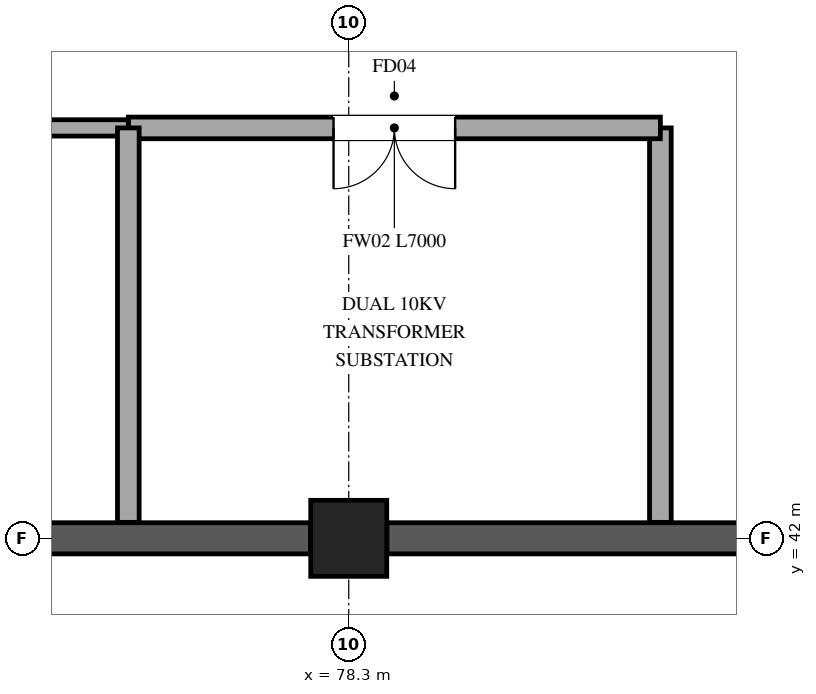
"""IFC4 building model, lengths in metres.
Left out: names, types, materials, properties, quantities, classifications, styles, units other than length and angle.
Written with IfcOpenShell. Run it as: python <this file> out.ifc"""

import sys

from ifc_helpers import new_model, si_unit, direction, frame, frame_2d, origin, origin_2d, place, context, subcontext, project, spatial, rectangle, extrude, element, fill, save


model = new_model("IFC4")
c1 = context("Model", 3, precision=1e-05, world=origin(), true_north=direction((0.0, 1.0)))
c2 = subcontext(c1, "Body", "Model", "MODEL_VIEW")
j1 = project(units=[si_unit("LENGTHUNIT", "METRE"), si_unit("PLANEANGLEUNIT", "RADIAN")], contexts=[c1])
p1 = place(None, origin())
s1 = spatial("IfcSite", under=j1, at=p1, CompositionType="ELEMENT")
p2 = place(p1, origin())
s2 = spatial("IfcBuilding", under=s1, at=p2, CompositionType="ELEMENT")
p3 = place(p2, frame((0.0, 0.0, -4.8)))
s3 = spatial("IfcBuildingStorey", under=s2, at=p3, CompositionType="ELEMENT", Elevation=-4.8)
p4 = place(p3, frame((78.3, 42.0, 0.0), z_axis=(0.0, 0.0, 1.0), x_axis=(1.0, 0.0, 0.0)))
e1 = element("IfcColumn", 1, at=p4, inside=s3, PredefinedType="COLUMN", context=c2, shape_type="SweptSolid", body=[
    extrude(rectangle(XDim=1.0, YDim=1.0, at=origin_2d()), origin(), (0.0, 0.0, 1.0), 4.8),
])
for number, where, z_axis, x_axis in (
    (2, (86.498, 42.0, 0.0), (0.0, 0.0, 1.0), (-1.0, 0.0, 0.0)),
    (3, (77.798, 42.0, 0.0), (0.0, 0.0, 1.0), (-1.0, 0.0, 0.0)),
):
    element("IfcWall", number, at=place(p3, frame(where, z_axis=z_axis, x_axis=x_axis)), inside=s3, PredefinedType="USERDEFINED", context=c2, shape_type="SweptSolid", body=[
        extrude(rectangle(XDim=7.696, YDim=0.41, at=frame_2d((3.848, 0.0))), origin(), (0.0, 0.0, 1.0), 4.46),
    ])
p5 = place(p3, frame((82.4, 42.21, 0.0), z_axis=(0.0, 0.0, 1.0), x_axis=(0.0, 1.0, 0.0)))
e4 = element("IfcWall", 4, at=p5, inside=s3, PredefinedType="STANDARD", context=c2, shape_type="SweptSolid", body=[
    extrude(rectangle(XDim=5.19, YDim=0.285, at=frame_2d((2.595, 0.0))), origin(), (0.0, 0.0, 1.0), 3.8),
])
p6 = place(p3, frame((82.4, 47.4, 0.0), z_axis=(0.0, 0.0, 1.0), x_axis=(-1.0, 0.0, 0.0)))
e5 = element("IfcWall", 5, at=p6, inside=s3, PredefinedType="STANDARD", context=c2, shape_type="SweptSolid", body=[
    extrude(rectangle(XDim=7.0, YDim=0.285, at=frame_2d((3.5, 0.0))), origin(), (0.0, 0.0, 1.0), 3.65),
])
p7 = place(p6, frame((2.7, 0.0, 0.0)))
e6 = element("IfcOpeningElement", 6, at=p7, cuts=e5, PredefinedType="OPENING", context=c2, shape_type="SweptSolid", body=[
    extrude(rectangle(XDim=1.6, YDim=2.25, at=frame_2d((0.8, 1.125))), frame((0.0, 0.152, 0.0), z_axis=(0.0, -1.0, 0.0), x_axis=(1.0, 0.0, 0.0)), (0.0, 0.0, 1.0), 0.305),
])
p8 = place(p3, frame((75.4, 47.4, 0.0), z_axis=(0.0, 0.0, 1.0), x_axis=(-1.0, 0.0, 0.0)))
e7 = element("IfcWall", 7, at=p8, inside=s3, PredefinedType="PARTITIONING", context=c2, shape_type="SweptSolid", body=[
    extrude(rectangle(XDim=15.2, YDim=0.215, at=frame_2d((7.6, 0.0))), origin(), (0.0, 0.0, 1.0), 3.65),
])
p9 = place(p8, frame((6.925, 0.0, 0.0)))
e8 = element("IfcOpeningElement", 8, at=p9, cuts=e7, PredefinedType="OPENING", context=c2, shape_type="SweptSolid", body=[
    extrude(rectangle(XDim=1.35, YDim=2.2, at=frame_2d((0.675, 1.1))), frame((0.0, 0.118, 0.0), z_axis=(0.0, -1.0, 0.0), x_axis=(1.0, 0.0, 0.0)), (0.0, 0.0, 1.0), 0.235),
])
p10 = place(p3, frame((75.4, 42.21, 0.0), z_axis=(0.0, 0.0, 1.0), x_axis=(0.0, 1.0, 0.0)))
e9 = element("IfcWall", 9, at=p10, inside=s3, PredefinedType="STANDARD", context=c2, shape_type="SweptSolid", body=[
    extrude(rectangle(XDim=5.19, YDim=0.285, at=frame_2d((2.595, 0.0))), origin(), (0.0, 0.0, 1.0), 3.8),
])
p11 = place(p7, origin())
e10 = element("IfcDoor", 10, at=p11, inside=s3, OperationType="DOUBLE_DOOR_SINGLE_SWING", PredefinedType="DOOR", context=c2, shape_type="SweptSolid", body=[
    extrude(rectangle(XDim=1.6, YDim=2.25, at=frame_2d((0.8, 1.125))), frame((0.0, 0.025, 0.0), z_axis=(0.0, -1.0, 0.0), x_axis=(1.0, 0.0, 0.0)), (0.0, 0.0, 1.0), 0.05),
])
fill(e6, e10)
save(model, sys.argv[1])
